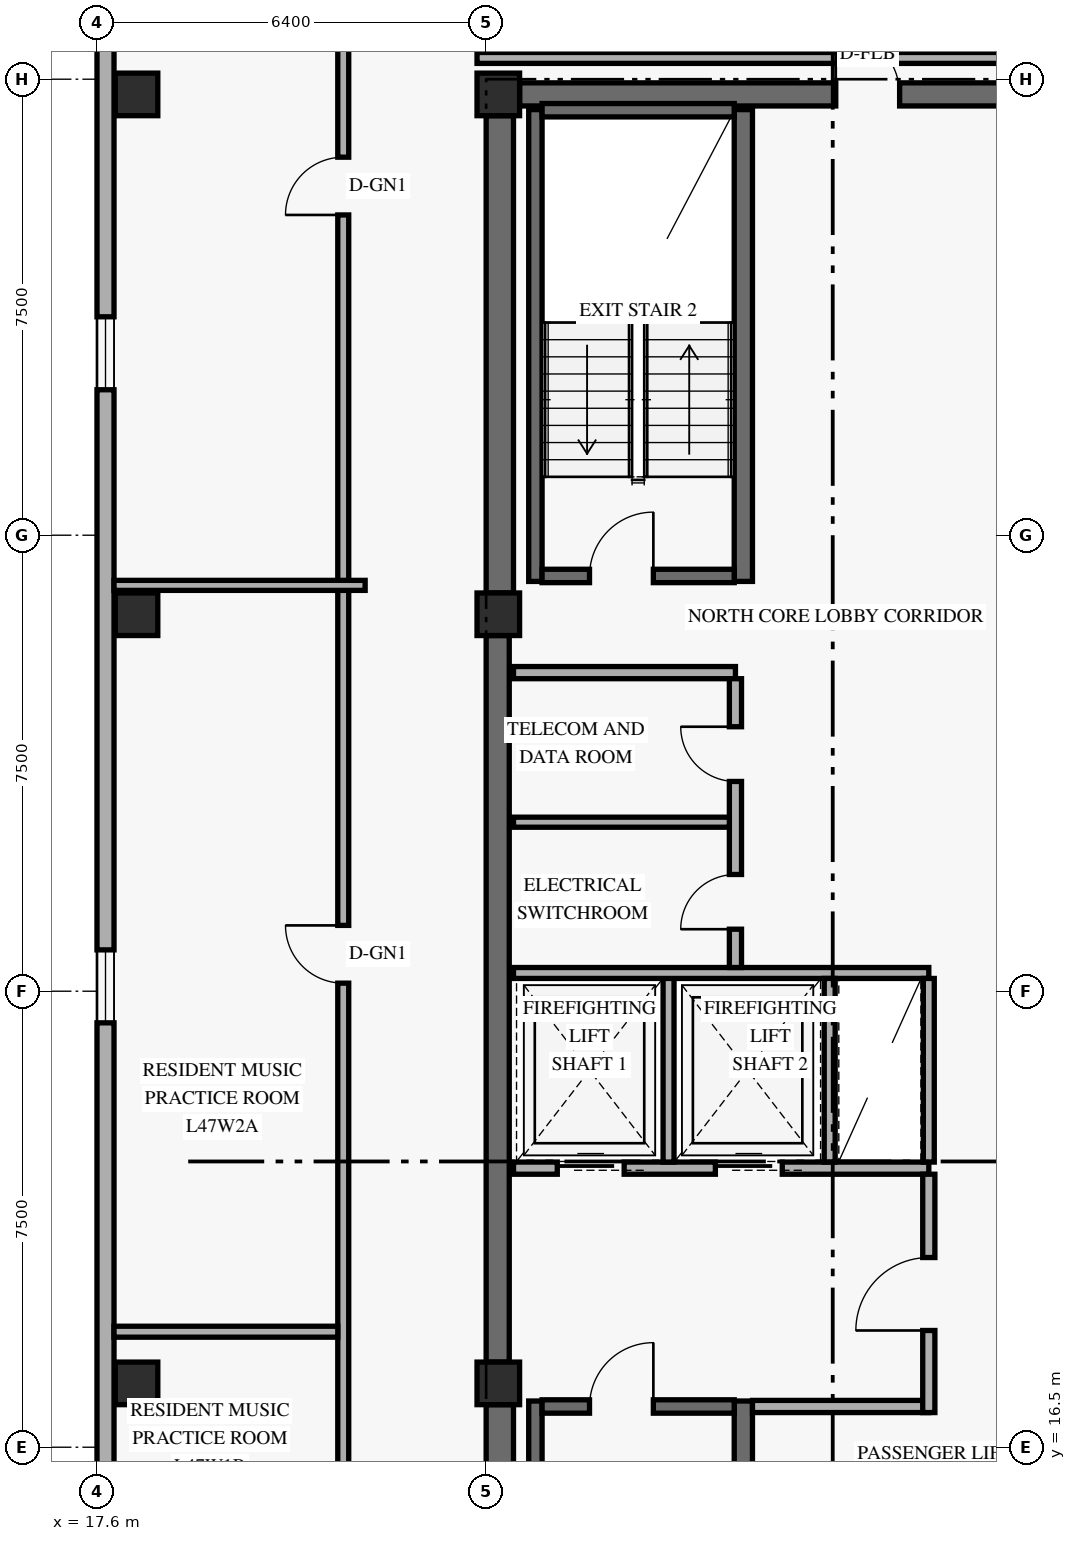
"""IFC4 building model, lengths in metres.
Left out: names, types, materials, properties, quantities, classifications, styles, units other than length and angle.
Written with IfcOpenShell. Run it as: python <this file> out.ifc"""

import sys

from ifc_helpers import new_model, si_unit, direction, frame, frame_2d, origin, origin_2d, place, context, subcontext, project, spatial, rectangle, extrude, element, fill, save


model = new_model("IFC4")
c1 = context("Model", 3, precision=1e-05, world=origin(), true_north=direction((0.0, 1.0)))
c2 = subcontext(c1, "Body", "Model", "MODEL_VIEW")
j1 = project(units=[si_unit("LENGTHUNIT", "METRE"), si_unit("PLANEANGLEUNIT", "RADIAN")], contexts=[c1])
p1 = place(None, origin())
s1 = spatial("IfcSite", under=j1, at=p1, CompositionType="ELEMENT")
p2 = place(p1, origin())
s2 = spatial("IfcBuilding", under=s1, at=p2, CompositionType="ELEMENT")
p3 = place(p2, frame((0.0, 0.0, 181.2)))
s3 = spatial("IfcBuildingStorey", under=s2, at=p3, CompositionType="ELEMENT", Elevation=181.2)
p4 = place(p3, frame((24.225, 9.6, 0.0), z_axis=(0.0, 0.0, 1.0), x_axis=(0.0, 1.0, 0.0)))
e1 = element("IfcWall", 1, at=p4, inside=s3, PredefinedType="SHEAR", context=c2, shape_type="SweptSolid", body=[
    extrude(rectangle(XDim=7.6, YDim=0.45, at=frame_2d((3.8, 0.0))), origin(), (0.0, 0.0, 1.0), 2.748),
])
p5 = place(p3, frame((24.19, 17.9, 0.0), z_axis=(0.0, 0.0, 1.0), x_axis=(0.0, 1.0, 0.0)))
e2 = element("IfcWall", 2, at=p5, inside=s3, PredefinedType="SHEAR", context=c2, shape_type="SweptSolid", body=[
    extrude(rectangle(XDim=11.95, YDim=0.38, at=frame_2d((5.975, 0.0))), origin(), (0.0, 0.0, 1.0), 2.748),
])
p6 = place(p3, frame((24.225, 30.55, 0.0), z_axis=(0.0, 0.0, 1.0), x_axis=(0.0, 1.0, 0.0)))
e3 = element("IfcWall", 3, at=p6, inside=s3, PredefinedType="SHEAR", context=c2, shape_type="SweptSolid", body=[
    extrude(rectangle(XDim=7.85, YDim=0.45, at=frame_2d((3.925, 0.0))), origin(), (0.0, 0.0, 1.0), 2.748),
])
p7 = place(p3, frame((24.55, 38.75, 0.0), z_axis=(0.0, 0.0, 1.0), x_axis=(1.0, 0.0, 0.0)))
e4 = element("IfcWall", 4, at=p7, inside=s3, PredefinedType="SHEAR", context=c2, shape_type="SweptSolid", body=[
    extrude(rectangle(XDim=10.3, YDim=0.38, at=frame_2d((5.15, 0.0))), origin(), (0.0, 0.0, 1.0), 3.36),
])
p8 = place(p7, frame((5.2, 0.0, 0.0)))
e5 = element("IfcOpeningElement", 5, at=p8, cuts=e4, PredefinedType="OPENING", context=c2, shape_type="SweptSolid", body=[
    extrude(rectangle(XDim=1.05, YDim=2.15, at=frame_2d((0.525, 1.075))), frame((0.0, 0.2, 0.0), z_axis=(0.0, -1.0, 0.0), x_axis=(1.0, 0.0, 0.0)), (0.0, 0.0, 1.0), 0.4),
])
p9 = place(p3, frame((24.81, 9.5, 0.0), z_axis=(0.0, 0.0, 1.0), x_axis=(0.0, 1.0, 0.0)))
e6 = element("IfcWall", 6, at=p9, inside=s3, PredefinedType="SHEAR", context=c2, shape_type="SweptSolid", body=[
    extrude(rectangle(XDim=7.76, YDim=0.22, at=frame_2d((3.88, 0.0))), origin(), (0.0, 0.0, 1.0), 3.36),
])
p10 = place(p3, frame((28.23, 9.5, 0.0), z_axis=(0.0, 0.0, 1.0), x_axis=(0.0, 1.0, 0.0)))
e7 = element("IfcWall", 7, at=p10, inside=s3, PredefinedType="SHEAR", context=c2, shape_type="SweptSolid", body=[
    extrude(rectangle(XDim=7.76, YDim=0.3, at=frame_2d((3.88, 0.0))), origin(), (0.0, 0.0, 1.0), 3.36),
])
p11 = place(p3, frame((24.92, 17.17, 0.0), z_axis=(0.0, 0.0, 1.0), x_axis=(1.0, 0.0, 0.0)))
e8 = element("IfcWall", 8, at=p11, inside=s3, PredefinedType="SHEAR", context=c2, shape_type="SweptSolid", body=[
    extrude(rectangle(XDim=3.16, YDim=0.22, at=frame_2d((1.58, 0.0))), origin(), (0.0, 0.0, 1.0), 3.36),
])
p12 = place(p11, frame((0.78, 0.0, 0.0)))
e9 = element("IfcOpeningElement", 9, at=p12, cuts=e8, PredefinedType="OPENING", context=c2, shape_type="SweptSolid", body=[
    extrude(rectangle(XDim=1.05, YDim=2.15, at=frame_2d((0.525, 1.075))), frame((0.0, 0.12, 0.0), z_axis=(0.0, -1.0, 0.0), x_axis=(1.0, 0.0, 0.0)), (0.0, 0.0, 1.0), 0.24),
])
p13 = place(p3, frame((24.81, 30.74, 0.0), z_axis=(0.0, 0.0, 1.0), x_axis=(0.0, 1.0, 0.0)))
e10 = element("IfcWall", 10, at=p13, inside=s3, PredefinedType="SHEAR", context=c2, shape_type="SweptSolid", body=[
    extrude(rectangle(XDim=7.76, YDim=0.22, at=frame_2d((3.88, 0.0))), origin(), (0.0, 0.0, 1.0), 3.36),
])
p14 = place(p3, frame((28.23, 30.74, 0.0), z_axis=(0.0, 0.0, 1.0), x_axis=(0.0, 1.0, 0.0)))
e11 = element("IfcWall", 11, at=p14, inside=s3, PredefinedType="SHEAR", context=c2, shape_type="SweptSolid", body=[
    extrude(rectangle(XDim=7.76, YDim=0.3, at=frame_2d((3.88, 0.0))), origin(), (0.0, 0.0, 1.0), 3.36),
])
p15 = place(p3, frame((24.92, 30.83, 0.0), z_axis=(0.0, 0.0, 1.0), x_axis=(1.0, 0.0, 0.0)))
e12 = element("IfcWall", 12, at=p15, inside=s3, PredefinedType="SHEAR", context=c2, shape_type="SweptSolid", body=[
    extrude(rectangle(XDim=3.16, YDim=0.22, at=frame_2d((1.58, 0.0))), origin(), (0.0, 0.0, 1.0), 3.36),
])
p16 = place(p15, frame((0.78, 0.0, 0.0)))
e13 = element("IfcOpeningElement", 13, at=p16, cuts=e12, PredefinedType="OPENING", context=c2, shape_type="SweptSolid", body=[
    extrude(rectangle(XDim=1.05, YDim=2.15, at=frame_2d((0.525, 1.075))), frame((0.0, 0.12, 0.0), z_axis=(0.0, -1.0, 0.0), x_axis=(1.0, 0.0, 0.0)), (0.0, 0.0, 1.0), 0.24),
])
p17 = place(p3, frame((24.92, 38.49, 0.0), z_axis=(0.0, 0.0, 1.0), x_axis=(1.0, 0.0, 0.0)))
e14 = element("IfcWall", 14, at=p17, inside=s3, PredefinedType="SHEAR", context=c2, shape_type="SweptSolid", body=[
    extrude(rectangle(XDim=3.16, YDim=0.22, at=frame_2d((1.58, 0.0))), origin(), (0.0, 0.0, 1.0), 3.36),
])
for number, where, z_axis, x_axis in (
    (15, (18.25, 17.55, 0.0), (0.0, 0.0, 1.0), (1.0, 0.0, 0.0)),
    (16, (18.25, 30.2, 0.0), (0.0, 0.0, 1.0), (1.0, 0.0, 0.0)),
    (17, (18.25, 38.75, 0.0), (0.0, 0.0, 1.0), (1.0, 0.0, 0.0)),
    (18, (24.2, 17.55, 0.0), (0.0, 0.0, 1.0), (1.0, 0.0, 0.0)),
    (19, (24.2, 30.2, 0.0), (0.0, 0.0, 1.0), (1.0, 0.0, 0.0)),
    (20, (24.2, 38.75, 0.0), (0.0, 0.0, 1.0), (1.0, 0.0, 0.0)),
):
    element("IfcColumn", number, at=place(p3, frame(where, z_axis=z_axis, x_axis=x_axis)), inside=s3, PredefinedType="COLUMN", context=c2, shape_type="SweptSolid", body=[
        extrude(rectangle(XDim=0.7, YDim=0.7, at=origin_2d()), origin(), (0.0, 0.0, 1.0), 3.6),
    ])
p18 = place(p3, frame((17.74, 40.38, 0.0), z_axis=(0.0, 0.0, 1.0), x_axis=(0.0, -1.0, 0.0)))
e21 = element("IfcWall", 21, at=p18, inside=s3, PredefinedType="SOLIDWALL", context=c2, shape_type="SweptSolid", body=[
    extrude(rectangle(XDim=32.76, YDim=0.28, at=frame_2d((16.38, 0.0))), origin(), (0.0, 0.0, 1.0), 3.36),
])
p19 = place(p18, frame((29.073, 0.0, 0.85)))
e22 = element("IfcOpeningElement", 22, at=p19, cuts=e21, PredefinedType="OPENING", context=c2, shape_type="SweptSolid", body=[
    extrude(rectangle(XDim=1.2, YDim=1.5, at=frame_2d((0.6, 0.75))), frame((0.0, 0.15, 0.0), z_axis=(0.0, -1.0, 0.0), x_axis=(1.0, 0.0, 0.0)), (0.0, 0.0, 1.0), 0.3),
])
p20 = place(p18, frame((25.363, 0.0, 0.85)))
e23 = element("IfcOpeningElement", 23, at=p20, cuts=e21, PredefinedType="OPENING", context=c2, shape_type="SweptSolid", body=[
    extrude(rectangle(XDim=1.2, YDim=1.5, at=frame_2d((0.6, 0.75))), frame((0.0, 0.15, 0.0), z_axis=(0.0, -1.0, 0.0), x_axis=(1.0, 0.0, 0.0)), (0.0, 0.0, 1.0), 0.3),
])
p21 = place(p18, frame((15.7, 0.0, 0.85)))
e24 = element("IfcOpeningElement", 24, at=p21, cuts=e21, PredefinedType="OPENING", context=c2, shape_type="SweptSolid", body=[
    extrude(rectangle(XDim=1.2, YDim=1.5, at=frame_2d((0.6, 0.75))), frame((0.0, 0.15, 0.0), z_axis=(0.0, -1.0, 0.0), x_axis=(1.0, 0.0, 0.0)), (0.0, 0.0, 1.0), 0.3),
])
p22 = place(p18, frame((5.288, 0.0, 0.85)))
e25 = element("IfcOpeningElement", 25, at=p22, cuts=e21, PredefinedType="OPENING", context=c2, shape_type="SweptSolid", body=[
    extrude(rectangle(XDim=1.2, YDim=1.5, at=frame_2d((0.6, 0.75))), frame((0.0, 0.15, 0.0), z_axis=(0.0, -1.0, 0.0), x_axis=(1.0, 0.0, 0.0)), (0.0, 0.0, 1.0), 0.3),
])
p23 = place(p3, frame((24.45, 21.09, 0.0), z_axis=(0.0, 0.0, 1.0), x_axis=(1.0, 0.0, 0.0)))
e26 = element("IfcWall", 26, at=p23, inside=s3, PredefinedType="STANDARD", context=c2, shape_type="SweptSolid", body=[
    extrude(rectangle(XDim=6.83, YDim=0.2, at=frame_2d((3.415, 0.0))), origin(), (0.0, 0.0, 1.0), 3.36),
])
p24 = place(p23, frame((0.72, 0.0, 0.0)))
e27 = element("IfcOpeningElement", 27, at=p24, cuts=e26, PredefinedType="OPENING", context=c2, shape_type="SweptSolid", body=[
    extrude(rectangle(XDim=1.1, YDim=2.2, at=frame_2d((0.55, 1.1))), frame((0.0, 0.11, 0.0), z_axis=(0.0, -1.0, 0.0), x_axis=(1.0, 0.0, 0.0)), (0.0, 0.0, 1.0), 0.22),
])
p25 = place(p23, frame((3.32, 0.0, 0.0)))
e28 = element("IfcOpeningElement", 28, at=p25, cuts=e26, PredefinedType="OPENING", context=c2, shape_type="SweptSolid", body=[
    extrude(rectangle(XDim=1.1, YDim=2.2, at=frame_2d((0.55, 1.1))), frame((0.0, 0.11, 0.0), z_axis=(0.0, -1.0, 0.0), x_axis=(1.0, 0.0, 0.0)), (0.0, 0.0, 1.0), 0.22),
])
p26 = place(p3, frame((28.38, 17.17, 0.0), z_axis=(0.0, 0.0, 1.0), x_axis=(1.0, 0.0, 0.0)))
e29 = element("IfcWall", 29, at=p26, inside=s3, PredefinedType="STANDARD", context=c2, shape_type="SweptSolid", body=[
    extrude(rectangle(XDim=2.9, YDim=0.2, at=frame_2d((1.45, 0.0))), origin(), (0.0, 0.0, 1.0), 3.36),
])
p27 = place(p3, frame((31.28, 17.07, 0.0), z_axis=(0.0, 0.0, 1.0), x_axis=(0.0, 1.0, 0.0)))
e30 = element("IfcWall", 30, at=p27, inside=s3, PredefinedType="STANDARD", context=c2, shape_type="SweptSolid", body=[
    extrude(rectangle(XDim=3.92, YDim=0.2, at=frame_2d((1.96, 0.0))), origin(), (0.0, 0.0, 1.0), 2.73),
])
p28 = place(p27, frame((1.35, 0.0, 0.0)))
e31 = element("IfcOpeningElement", 31, at=p28, cuts=e30, PredefinedType="OPENING", context=c2, shape_type="SweptSolid", body=[
    extrude(rectangle(XDim=1.2, YDim=2.15, at=frame_2d((0.6, 1.075))), frame((0.0, 0.11, 0.0), z_axis=(0.0, -1.0, 0.0), x_axis=(1.0, 0.0, 0.0)), (0.0, 0.0, 1.0), 0.22),
])
p29 = place(p3, frame((27.0, 21.19, 0.0), z_axis=(0.0, 0.0, 1.0), x_axis=(0.0, 1.0, 0.0)))
e32 = element("IfcWall", 32, at=p29, inside=s3, PredefinedType="STANDARD", context=c2, shape_type="SweptSolid", body=[
    extrude(rectangle(XDim=3.11, YDim=0.18, at=frame_2d((1.555, 0.0))), origin(), (0.0, 0.0, 1.0), 3.36),
])
p30 = place(p3, frame((24.45, 24.3, 0.0), z_axis=(0.0, 0.0, 1.0), x_axis=(1.0, 0.0, 0.0)))
e33 = element("IfcWall", 33, at=p30, inside=s3, PredefinedType="STANDARD", context=c2, shape_type="SweptSolid", body=[
    extrude(rectangle(XDim=6.83, YDim=0.18, at=frame_2d((3.415, 0.0))), origin(), (0.0, 0.0, 1.0), 3.36),
])
for number, where, z_axis, x_axis in (
    (34, (29.65, 21.19, 0.0), (0.0, 0.0, 1.0), (0.0, 1.0, 0.0)),
    (35, (31.28, 21.19, 0.0), (0.0, 0.0, 1.0), (0.0, 1.0, 0.0)),
):
    element("IfcWall", number, at=place(p3, frame(where, z_axis=z_axis, x_axis=x_axis)), inside=s3, PredefinedType="STANDARD", context=c2, shape_type="SweptSolid", body=[
        extrude(rectangle(XDim=3.02, YDim=0.18, at=frame_2d((1.51, 0.0))), origin(), (0.0, 0.0, 1.0), 3.36),
    ])
p31 = place(p3, frame((24.45, 29.24, 0.0), z_axis=(0.0, 0.0, 1.0), x_axis=(1.0, 0.0, 0.0)))
e36 = element("IfcWall", 36, at=p31, inside=s3, PredefinedType="STANDARD", context=c2, shape_type="SweptSolid", body=[
    extrude(rectangle(XDim=3.65, YDim=0.2, at=frame_2d((1.825, 0.0))), origin(), (0.0, 0.0, 1.0), 3.36),
])
p32 = place(p3, frame((28.1, 24.39, 0.0), z_axis=(0.0, 0.0, 1.0), x_axis=(0.0, 1.0, 0.0)))
e37 = element("IfcWall", 37, at=p32, inside=s3, PredefinedType="STANDARD", context=c2, shape_type="SweptSolid", body=[
    extrude(rectangle(XDim=4.75, YDim=0.2, at=frame_2d((2.375, 0.0))), origin(), (0.0, 0.0, 1.0), 3.36),
])
p33 = place(p32, frame((0.63, 0.0, 0.0)))
e38 = element("IfcOpeningElement", 38, at=p33, cuts=e37, PredefinedType="OPENING", context=c2, shape_type="SweptSolid", body=[
    extrude(rectangle(XDim=0.9, YDim=2.1, at=frame_2d((0.45, 1.05))), frame((0.0, 0.11, 0.0), z_axis=(0.0, -1.0, 0.0), x_axis=(1.0, 0.0, 0.0)), (0.0, 0.0, 1.0), 0.22),
])
p34 = place(p32, frame((3.06, 0.0, 0.0)))
e39 = element("IfcOpeningElement", 39, at=p34, cuts=e37, PredefinedType="OPENING", context=c2, shape_type="SweptSolid", body=[
    extrude(rectangle(XDim=0.9, YDim=2.1, at=frame_2d((0.45, 1.05))), frame((0.0, 0.11, 0.0), z_axis=(0.0, -1.0, 0.0), x_axis=(1.0, 0.0, 0.0)), (0.0, 0.0, 1.0), 0.22),
])
p35 = place(p3, frame((24.45, 26.78, 0.0), z_axis=(0.0, 0.0, 1.0), x_axis=(1.0, 0.0, 0.0)))
e40 = element("IfcWall", 40, at=p35, inside=s3, PredefinedType="PARTITIONING", context=c2, shape_type="SweptSolid", body=[
    extrude(rectangle(XDim=3.55, YDim=0.165, at=frame_2d((1.775, 0.0))), origin(), (0.0, 0.0, 1.0), 3.36),
])
p36 = place(p3, frame((21.65, 6.8, 0.0), z_axis=(0.0, 0.0, 1.0), x_axis=(0.0, 1.0, 0.0)))
e41 = element("IfcWall", 41, at=p36, inside=s3, PredefinedType="STANDARD", context=c2, shape_type="SweptSolid", body=[
    extrude(rectangle(XDim=34.4, YDim=0.18, at=frame_2d((17.2, 0.0))), origin(), (0.0, 0.0, 1.0), 2.73),
])
p37 = place(p36, frame((0.732, 0.0, 0.0)))
e42 = element("IfcOpeningElement", 42, at=p37, cuts=e41, PredefinedType="OPENING", context=c2, shape_type="SweptSolid", body=[
    extrude(rectangle(XDim=0.95, YDim=2.15, at=frame_2d((0.475, 1.075))), frame((0.0, 0.1, 0.0), z_axis=(0.0, -1.0, 0.0), x_axis=(1.0, 0.0, 0.0)), (0.0, 0.0, 1.0), 0.2),
])
p38 = place(p36, frame((7.768, 0.0, 0.0)))
e43 = element("IfcOpeningElement", 43, at=p38, cuts=e41, PredefinedType="OPENING", context=c2, shape_type="SweptSolid", body=[
    extrude(rectangle(XDim=0.95, YDim=2.15, at=frame_2d((0.475, 1.075))), frame((0.0, 0.1, 0.0), z_axis=(0.0, -1.0, 0.0), x_axis=(1.0, 0.0, 0.0)), (0.0, 0.0, 1.0), 0.2),
])
p39 = place(p36, frame((17.333, 0.0, 0.0)))
e44 = element("IfcOpeningElement", 44, at=p39, cuts=e41, PredefinedType="OPENING", context=c2, shape_type="SweptSolid", body=[
    extrude(rectangle(XDim=0.95, YDim=2.15, at=frame_2d((0.475, 1.075))), frame((0.0, 0.1, 0.0), z_axis=(0.0, -1.0, 0.0), x_axis=(1.0, 0.0, 0.0)), (0.0, 0.0, 1.0), 0.2),
])
p40 = place(p36, frame((29.968, 0.0, 0.0)))
e45 = element("IfcOpeningElement", 45, at=p40, cuts=e41, PredefinedType="OPENING", context=c2, shape_type="SweptSolid", body=[
    extrude(rectangle(XDim=0.95, YDim=2.15, at=frame_2d((0.475, 1.075))), frame((0.0, 0.1, 0.0), z_axis=(0.0, -1.0, 0.0), x_axis=(1.0, 0.0, 0.0)), (0.0, 0.0, 1.0), 0.2),
])
p41 = place(p3, frame((23.85, 39.35, 0.0), z_axis=(0.0, 0.0, 1.0), x_axis=(1.0, 0.0, 0.0)))
e46 = element("IfcWall", 46, at=p41, inside=s3, PredefinedType="STANDARD", context=c2, shape_type="SweptSolid", body=[
    extrude(rectangle(XDim=11.57, YDim=0.18, at=frame_2d((5.785, 0.0))), origin(), (0.0, 0.0, 1.0), 2.73),
])
p42 = place(p3, frame((17.88, 18.4, 0.0), z_axis=(0.0, 0.0, 1.0), x_axis=(1.0, 0.0, 0.0)))
e47 = element("IfcWall", 47, at=p42, inside=s3, PredefinedType="PARTITIONING", context=c2, shape_type="SweptSolid", body=[
    extrude(rectangle(XDim=3.68, YDim=0.18, at=frame_2d((1.84, 0.0))), origin(), (0.0, 0.0, 1.0), 2.879),
])
p43 = place(p3, frame((17.88, 30.675, 0.0), z_axis=(0.0, 0.0, 1.0), x_axis=(1.0, 0.0, 0.0)))
e48 = element("IfcWall", 48, at=p43, inside=s3, PredefinedType="PARTITIONING", context=c2, shape_type="SweptSolid", body=[
    extrude(rectangle(XDim=4.13, YDim=0.165, at=frame_2d((2.065, 0.0))), origin(), (0.0, 0.0, 1.0), 2.879),
])
p44 = place(p21, origin())
e49 = element("IfcWindow", 49, at=p44, inside=s3, PartitioningType="SINGLE_PANEL", PredefinedType="WINDOW", context=c2, shape_type="SweptSolid", body=[
    extrude(rectangle(XDim=1.2, YDim=1.5, at=frame_2d((0.6, 0.75))), frame((0.0, 0.03, 0.0), z_axis=(0.0, -1.0, 0.0), x_axis=(1.0, 0.0, 0.0)), (0.0, 0.0, 1.0), 0.06),
])
fill(e24, e49)
p45 = place(p22, origin())
e50 = element("IfcWindow", 50, at=p45, inside=s3, PartitioningType="SINGLE_PANEL", PredefinedType="WINDOW", context=c2, shape_type="SweptSolid", body=[
    extrude(rectangle(XDim=1.2, YDim=1.5, at=frame_2d((0.6, 0.75))), frame((0.0, 0.03, 0.0), z_axis=(0.0, -1.0, 0.0), x_axis=(1.0, 0.0, 0.0)), (0.0, 0.0, 1.0), 0.06),
])
fill(e25, e50)
p46 = place(p12, frame((1.05, 0.0, 0.0), z_axis=(0.0, 0.0, 1.0), x_axis=(-1.0, 0.0, 0.0)))
e51 = element("IfcDoor", 51, at=p46, inside=s3, OperationType="SINGLE_SWING_LEFT", PredefinedType="DOOR", context=c2, shape_type="SweptSolid", body=[
    extrude(rectangle(XDim=1.05, YDim=2.15, at=frame_2d((0.525, 1.075))), frame((0.0, 0.025, 0.0), z_axis=(0.0, -1.0, 0.0), x_axis=(1.0, 0.0, 0.0)), (0.0, 0.0, 1.0), 0.05),
])
fill(e9, e51)
p47 = place(p16, origin())
e52 = element("IfcDoor", 52, at=p47, inside=s3, OperationType="SINGLE_SWING_RIGHT", PredefinedType="DOOR", context=c2, shape_type="SweptSolid", body=[
    extrude(rectangle(XDim=1.05, YDim=2.15, at=frame_2d((0.525, 1.075))), frame((0.0, 0.025, 0.0), z_axis=(0.0, -1.0, 0.0), x_axis=(1.0, 0.0, 0.0)), (0.0, 0.0, 1.0), 0.05),
])
fill(e13, e52)
p48 = place(p24, origin())
e53 = element("IfcDoor", 53, at=p48, inside=s3, OperationType="SLIDING_TO_LEFT", PredefinedType="DOOR", context=c2, shape_type="SweptSolid", body=[
    extrude(rectangle(XDim=1.1, YDim=2.2, at=frame_2d((0.55, 1.1))), frame((0.0, 0.025, 0.0), z_axis=(0.0, -1.0, 0.0), x_axis=(1.0, 0.0, 0.0)), (0.0, 0.0, 1.0), 0.05),
])
fill(e27, e53)
p49 = place(p25, origin())
e54 = element("IfcDoor", 54, at=p49, inside=s3, OperationType="SLIDING_TO_LEFT", PredefinedType="DOOR", context=c2, shape_type="SweptSolid", body=[
    extrude(rectangle(XDim=1.1, YDim=2.2, at=frame_2d((0.55, 1.1))), frame((0.0, 0.025, 0.0), z_axis=(0.0, -1.0, 0.0), x_axis=(1.0, 0.0, 0.0)), (0.0, 0.0, 1.0), 0.05),
])
fill(e28, e54)
p50 = place(p28, origin())
e55 = element("IfcDoor", 55, at=p50, inside=s3, OperationType="SINGLE_SWING_LEFT", PredefinedType="DOOR", context=c2, shape_type="SweptSolid", body=[
    extrude(rectangle(XDim=1.2, YDim=2.15, at=frame_2d((0.6, 1.075))), frame((0.0, 0.025, 0.0), z_axis=(0.0, -1.0, 0.0), x_axis=(1.0, 0.0, 0.0)), (0.0, 0.0, 1.0), 0.05),
])
fill(e31, e55)
p51 = place(p33, origin())
e56 = element("IfcDoor", 56, at=p51, inside=s3, OperationType="SINGLE_SWING_LEFT", PredefinedType="DOOR", context=c2, shape_type="SweptSolid", body=[
    extrude(rectangle(XDim=0.9, YDim=2.1, at=frame_2d((0.45, 1.05))), frame((0.0, 0.025, 0.0), z_axis=(0.0, -1.0, 0.0), x_axis=(1.0, 0.0, 0.0)), (0.0, 0.0, 1.0), 0.05),
])
fill(e38, e56)
p52 = place(p34, origin())
e57 = element("IfcDoor", 57, at=p52, inside=s3, OperationType="SINGLE_SWING_RIGHT", PredefinedType="DOOR", context=c2, shape_type="SweptSolid", body=[
    extrude(rectangle(XDim=0.9, YDim=2.1, at=frame_2d((0.45, 1.05))), frame((0.0, 0.025, 0.0), z_axis=(0.0, -1.0, 0.0), x_axis=(1.0, 0.0, 0.0)), (0.0, 0.0, 1.0), 0.05),
])
fill(e39, e57)
p53 = place(p8, frame((1.05, 0.0, 0.0), z_axis=(0.0, 0.0, 1.0), x_axis=(-1.0, 0.0, 0.0)))
e58 = element("IfcDoor", 58, at=p53, inside=s3, OperationType="SINGLE_SWING_RIGHT", PredefinedType="DOOR", context=c2, shape_type="SweptSolid", body=[
    extrude(rectangle(XDim=1.05, YDim=2.15, at=frame_2d((0.525, 1.075))), frame((0.0, 0.025, 0.0), z_axis=(0.0, -1.0, 0.0), x_axis=(1.0, 0.0, 0.0)), (0.0, 0.0, 1.0), 0.05),
])
fill(e5, e58)
p54 = place(p39, origin())
e59 = element("IfcDoor", 59, at=p54, inside=s3, OperationType="SINGLE_SWING_RIGHT", PredefinedType="DOOR", context=c2, shape_type="SweptSolid", body=[
    extrude(rectangle(XDim=0.95, YDim=2.15, at=frame_2d((0.475, 1.075))), frame((0.0, 0.025, 0.0), z_axis=(0.0, -1.0, 0.0), x_axis=(1.0, 0.0, 0.0)), (0.0, 0.0, 1.0), 0.05),
])
fill(e44, e59)
p55 = place(p40, origin())
e60 = element("IfcDoor", 60, at=p55, inside=s3, OperationType="SINGLE_SWING_LEFT", PredefinedType="DOOR", context=c2, shape_type="SweptSolid", body=[
    extrude(rectangle(XDim=0.95, YDim=2.15, at=frame_2d((0.475, 1.075))), frame((0.0, 0.025, 0.0), z_axis=(0.0, -1.0, 0.0), x_axis=(1.0, 0.0, 0.0)), (0.0, 0.0, 1.0), 0.05),
])
fill(e45, e60)
save(model, sys.argv[1])
